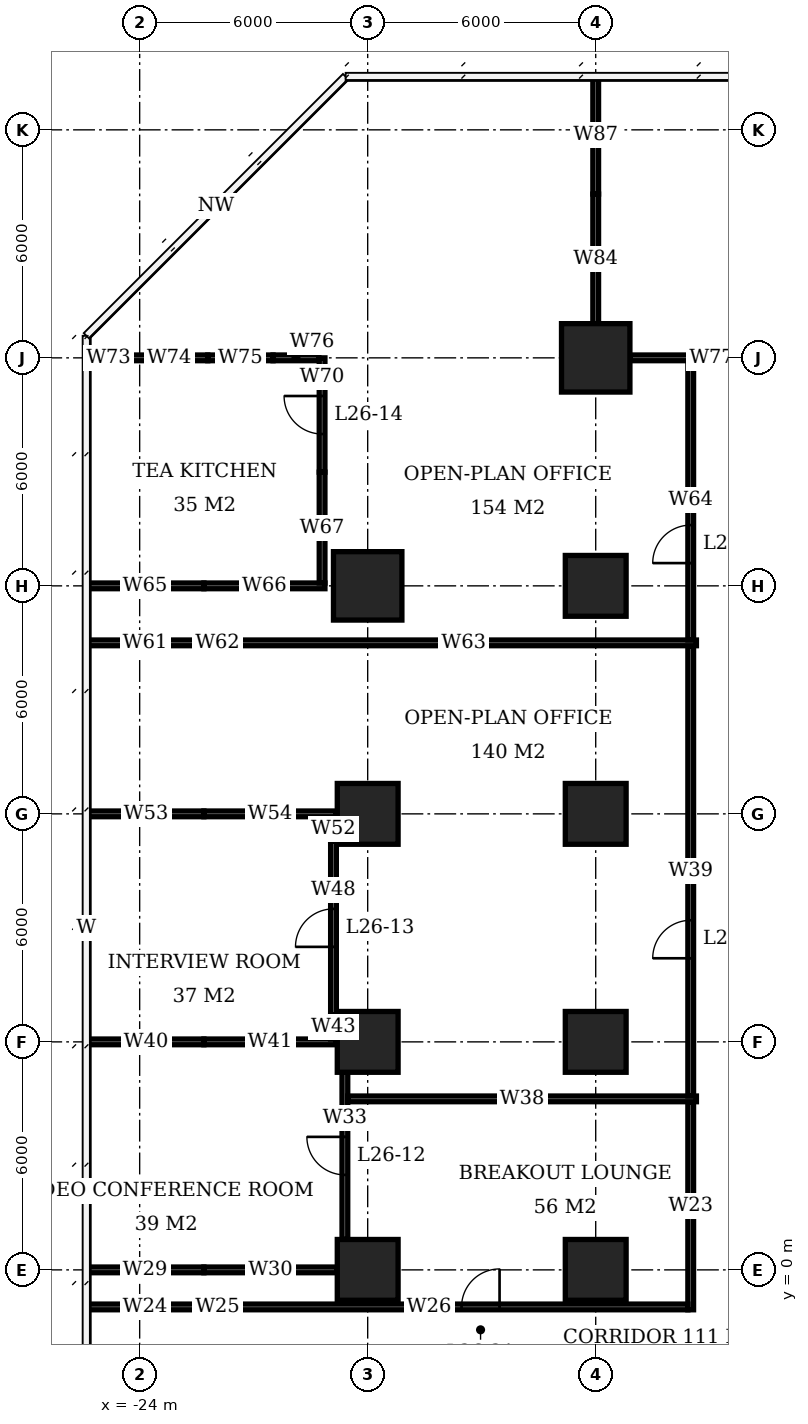
"""IFC4 building model, lengths in metres.
Left out: names, types, materials, properties, quantities, classifications, styles, units other than length and angle.
Written with IfcOpenShell. Run it as: python <this file> out.ifc"""

import sys

from ifc_helpers import new_model, si_unit, direction, frame, frame_2d, origin, origin_2d, place, context, subcontext, project, spatial, rectangle, extrude, element, fill, save


model = new_model("IFC4")
c1 = context("Model", 3, precision=1e-05, world=origin(), true_north=direction((0.0, 1.0)))
c2 = subcontext(c1, "Body", "Model", "MODEL_VIEW")
j1 = project(units=[si_unit("LENGTHUNIT", "METRE"), si_unit("PLANEANGLEUNIT", "RADIAN")], contexts=[c1])
p1 = place(None, origin())
s1 = spatial("IfcSite", under=j1, at=p1, CompositionType="ELEMENT")
p2 = place(p1, origin())
s2 = spatial("IfcBuilding", under=s1, at=p2, CompositionType="ELEMENT")
p3 = place(p2, frame((0.0, 0.0, 109.4)))
s3 = spatial("IfcBuildingStorey", under=s2, at=p3, CompositionType="ELEMENT", Elevation=109.4)
for number, where, z_axis, x_axis in (
    (1, (-18.0, 0.0, 0.0), (0.0, 0.0, 1.0), (1.0, 0.0, 0.0)),
    (2, (-18.0, 6.0, 0.0), (0.0, 0.0, 1.0), (1.0, 0.0, 0.0)),
    (3, (-18.0, 12.0, 0.0), (0.0, 0.0, 1.0), (1.0, 0.0, 0.0)),
):
    element("IfcColumn", number, at=place(p3, frame(where, z_axis=z_axis, x_axis=x_axis)), inside=s3, PredefinedType="COLUMN", context=c2, shape_type="SweptSolid", body=[
        extrude(rectangle(XDim=1.6, YDim=1.6, at=origin_2d()), origin(), (0.0, 0.0, 1.0), 3.9),
    ])
p4 = place(p3, frame((-18.0, 18.0, 0.0), z_axis=(0.0, 0.0, 1.0), x_axis=(1.0, 0.0, 0.0)))
e4 = element("IfcColumn", 4, at=p4, inside=s3, PredefinedType="COLUMN", context=c2, shape_type="SweptSolid", body=[
    extrude(rectangle(XDim=1.8, YDim=1.8, at=origin_2d()), origin(), (0.0, 0.0, 1.0), 3.9),
])
for number, where, z_axis, x_axis in (
    (5, (-12.0, 0.0, 0.0), (0.0, 0.0, 1.0), (1.0, 0.0, 0.0)),
    (6, (-12.0, 6.0, 0.0), (0.0, 0.0, 1.0), (1.0, 0.0, 0.0)),
    (7, (-12.0, 12.0, 0.0), (0.0, 0.0, 1.0), (1.0, 0.0, 0.0)),
    (8, (-12.0, 18.0, 0.0), (0.0, 0.0, 1.0), (1.0, 0.0, 0.0)),
):
    element("IfcColumn", number, at=place(p3, frame(where, z_axis=z_axis, x_axis=x_axis)), inside=s3, PredefinedType="COLUMN", context=c2, shape_type="SweptSolid", body=[
        extrude(rectangle(XDim=1.6, YDim=1.6, at=origin_2d()), origin(), (0.0, 0.0, 1.0), 3.9),
    ])
p5 = place(p3, frame((-12.0, 24.0, 0.0), z_axis=(0.0, 0.0, 1.0), x_axis=(1.0, 0.0, 0.0)))
e9 = element("IfcColumn", 9, at=p5, inside=s3, PredefinedType="COLUMN", context=c2, shape_type="SweptSolid", body=[
    extrude(rectangle(XDim=1.8, YDim=1.8, at=origin_2d()), origin(), (0.0, 0.0, 1.0), 3.9),
])
p6 = place(p3, frame((-25.4, 0.0, 0.0), z_axis=(0.0, 0.0, 1.0), x_axis=(1.0, 0.0, 0.0)))
e10 = element("IfcWall", 10, at=p6, inside=s3, PredefinedType="PARTITIONING", context=c2, shape_type="SweptSolid", body=[
    extrude(rectangle(XDim=3.09, YDim=0.15, at=frame_2d((1.545, 0.0))), origin(), (0.0, 0.0, 1.0), 3.65),
])
p7 = place(p3, frame((-22.31, 0.0, 0.0), z_axis=(0.0, 0.0, 1.0), x_axis=(1.0, 0.0, 0.0)))
e11 = element("IfcWall", 11, at=p7, inside=s3, PredefinedType="PARTITIONING", context=c2, shape_type="SweptSolid", body=[
    extrude(rectangle(XDim=3.51, YDim=0.15, at=frame_2d((1.755, 0.0))), origin(), (0.0, 0.0, 1.0), 2.65),
])
p8 = place(p3, frame((-25.35, 6.0, 0.0), z_axis=(0.0, 0.0, 1.0), x_axis=(1.0, 0.0, 0.0)))
e12 = element("IfcWall", 12, at=p8, inside=s3, PredefinedType="PARTITIONING", context=c2, shape_type="SweptSolid", body=[
    extrude(rectangle(XDim=3.04, YDim=0.15, at=frame_2d((1.52, 0.0))), origin(), (0.0, 0.0, 1.0), 3.65),
])
p9 = place(p3, frame((-22.31, 6.0, 0.0), z_axis=(0.0, 0.0, 1.0), x_axis=(1.0, 0.0, 0.0)))
e13 = element("IfcWall", 13, at=p9, inside=s3, PredefinedType="PARTITIONING", context=c2, shape_type="SweptSolid", body=[
    extrude(rectangle(XDim=3.485, YDim=0.15, at=frame_2d((1.743, 0.0))), origin(), (0.0, 0.0, 1.0), 2.65),
])
p10 = place(p3, frame((-25.35, 12.0, 0.0), z_axis=(0.0, 0.0, 1.0), x_axis=(1.0, 0.0, 0.0)))
e14 = element("IfcWall", 14, at=p10, inside=s3, PredefinedType="PARTITIONING", context=c2, shape_type="SweptSolid", body=[
    extrude(rectangle(XDim=3.04, YDim=0.15, at=frame_2d((1.52, 0.0))), origin(), (0.0, 0.0, 1.0), 3.65),
])
p11 = place(p3, frame((-22.31, 12.0, 0.0), z_axis=(0.0, 0.0, 1.0), x_axis=(1.0, 0.0, 0.0)))
e15 = element("IfcWall", 15, at=p11, inside=s3, PredefinedType="PARTITIONING", context=c2, shape_type="SweptSolid", body=[
    extrude(rectangle(XDim=3.485, YDim=0.15, at=frame_2d((1.743, 0.0))), origin(), (0.0, 0.0, 1.0), 2.65),
])
p12 = place(p3, frame((-25.4, 18.0, 0.0), z_axis=(0.0, 0.0, 1.0), x_axis=(1.0, 0.0, 0.0)))
e16 = element("IfcWall", 16, at=p12, inside=s3, PredefinedType="PARTITIONING", context=c2, shape_type="SweptSolid", body=[
    extrude(rectangle(XDim=3.09, YDim=0.15, at=frame_2d((1.545, 0.0))), origin(), (0.0, 0.0, 1.0), 3.65),
])
p13 = place(p3, frame((-22.31, 18.0, 0.0), z_axis=(0.0, 0.0, 1.0), x_axis=(1.0, 0.0, 0.0)))
e17 = element("IfcWall", 17, at=p13, inside=s3, PredefinedType="PARTITIONING", context=c2, shape_type="SweptSolid", body=[
    extrude(rectangle(XDim=3.185, YDim=0.15, at=frame_2d((1.593, 0.0))), origin(), (0.0, 0.0, 1.0), 2.65),
])
p14 = place(p3, frame((-25.4, 24.0, 0.0), z_axis=(0.0, 0.0, 1.0), x_axis=(1.0, 0.0, 0.0)))
e18 = element("IfcWall", 18, at=p14, inside=s3, PredefinedType="PARTITIONING", context=c2, shape_type="SweptSolid", body=[
    extrude(rectangle(XDim=1.163, YDim=0.15, at=frame_2d((0.582, 0.0))), origin(), (0.0, 0.0, 1.0), 3.65),
])
p15 = place(p3, frame((-24.237, 24.0, 0.0), z_axis=(0.0, 0.0, 1.0), x_axis=(1.0, 0.0, 0.0)))
e19 = element("IfcWall", 19, at=p15, inside=s3, PredefinedType="PARTITIONING", context=c2, shape_type="SweptSolid", body=[
    extrude(rectangle(XDim=2.029, YDim=0.15, at=frame_2d((1.015, 0.0))), origin(), (0.0, 0.0, 1.0), 2.65),
])
p16 = place(p3, frame((-22.208, 24.0, 0.0), z_axis=(0.0, 0.0, 1.0), x_axis=(1.0, 0.0, 0.0)))
e20 = element("IfcWall", 20, at=p16, inside=s3, PredefinedType="PARTITIONING", context=c2, shape_type="SweptSolid", body=[
    extrude(rectangle(XDim=1.718, YDim=0.15, at=frame_2d((0.859, 0.0))), origin(), (0.0, 0.0, 1.0), 3.65),
])
p17 = place(p3, frame((-20.49, 24.0, 0.0), z_axis=(0.0, 0.0, 1.0), x_axis=(1.0, 0.0, 0.0)))
e21 = element("IfcWall", 21, at=p17, inside=s3, PredefinedType="PARTITIONING", context=c2, shape_type="SweptSolid", body=[
    extrude(rectangle(XDim=1.205, YDim=0.15, at=frame_2d((0.603, 0.0))), origin(), (0.0, 0.0, 1.0), 2.65),
])
p18 = place(p3, frame((-11.1, 24.0, 0.0), z_axis=(0.0, 0.0, 1.0), x_axis=(1.0, 0.0, 0.0)))
e22 = element("IfcWall", 22, at=p18, inside=s3, PredefinedType="PARTITIONING", context=c2, shape_type="SweptSolid", body=[
    extrude(rectangle(XDim=4.3, YDim=0.15, at=frame_2d((2.15, 0.0))), origin(), (0.0, 0.0, 1.0), 3.65),
])
p19 = place(p3, frame((-19.2, 18.075, 0.0), z_axis=(0.0, 0.0, 1.0), x_axis=(0.0, 1.0, 0.0)))
e23 = element("IfcWall", 23, at=p19, inside=s3, PredefinedType="PARTITIONING", context=c2, shape_type="SweptSolid", body=[
    extrude(rectangle(XDim=2.917, YDim=0.15, at=frame_2d((1.458, 0.0))), origin(), (0.0, 0.0, 1.0), 2.65),
])
p20 = place(p3, frame((-19.2, 20.992, 0.0), z_axis=(0.0, 0.0, 1.0), x_axis=(0.0, 1.0, 0.0)))
e24 = element("IfcWall", 24, at=p20, inside=s3, PredefinedType="PARTITIONING", context=c2, shape_type="SweptSolid", body=[
    extrude(rectangle(XDim=3.008, YDim=0.15, at=frame_2d((1.504, 0.0))), origin(), (0.0, 0.0, 1.0), 3.65),
])
p21 = place(p20, frame((1.004, 0.0, 0.0)))
e25 = element("IfcOpeningElement", 25, at=p21, cuts=e24, PredefinedType="OPENING", context=c2, shape_type="SweptSolid", body=[
    extrude(rectangle(XDim=1.0, YDim=2.1, at=frame_2d((0.5, 1.05))), frame((0.0, 0.085, 0.0), z_axis=(0.0, -1.0, 0.0), x_axis=(1.0, 0.0, 0.0)), (0.0, 0.0, 1.0), 0.17),
])
p22 = place(p3, frame((-18.9, 6.075, 0.0), z_axis=(0.0, 0.0, 1.0), x_axis=(0.0, 1.0, 0.0)))
e26 = element("IfcWall", 26, at=p22, inside=s3, PredefinedType="PARTITIONING", context=c2, shape_type="SweptSolid", body=[
    extrude(rectangle(XDim=0.635, YDim=0.15, at=frame_2d((0.317, 0.0))), origin(), (0.0, 0.0, 1.0), 2.65),
])
p23 = place(p3, frame((-18.9, 6.71, 0.0), z_axis=(0.0, 0.0, 1.0), x_axis=(0.0, 1.0, 0.0)))
e27 = element("IfcWall", 27, at=p23, inside=s3, PredefinedType="PARTITIONING", context=c2, shape_type="SweptSolid", body=[
    extrude(rectangle(XDim=4.58, YDim=0.15, at=frame_2d((2.29, 0.0))), origin(), (0.0, 0.0, 1.0), 3.65),
])
p24 = place(p23, frame((1.79, 0.0, 0.0)))
e28 = element("IfcOpeningElement", 28, at=p24, cuts=e27, PredefinedType="OPENING", context=c2, shape_type="SweptSolid", body=[
    extrude(rectangle(XDim=1.0, YDim=2.1, at=frame_2d((0.5, 1.05))), frame((0.0, 0.085, 0.0), z_axis=(0.0, -1.0, 0.0), x_axis=(1.0, 0.0, 0.0)), (0.0, 0.0, 1.0), 0.17),
])
p25 = place(p3, frame((-18.9, 11.29, 0.0), z_axis=(0.0, 0.0, 1.0), x_axis=(0.0, 1.0, 0.0)))
e29 = element("IfcWall", 29, at=p25, inside=s3, PredefinedType="PARTITIONING", context=c2, shape_type="SweptSolid", body=[
    extrude(rectangle(XDim=0.635, YDim=0.15, at=frame_2d((0.317, 0.0))), origin(), (0.0, 0.0, 1.0), 2.65),
])
p26 = place(p3, frame((-18.6, 0.8, 0.0), z_axis=(0.0, 0.0, 1.0), x_axis=(0.0, 1.0, 0.0)))
e30 = element("IfcWall", 30, at=p26, inside=s3, PredefinedType="PARTITIONING", context=c2, shape_type="SweptSolid", body=[
    extrude(rectangle(XDim=4.4, YDim=0.15, at=frame_2d((2.2, 0.0))), origin(), (0.0, 0.0, 1.0), 3.65),
])
p27 = place(p26, frame((1.7, 0.0, 0.0)))
e31 = element("IfcOpeningElement", 31, at=p27, cuts=e30, PredefinedType="OPENING", context=c2, shape_type="SweptSolid", body=[
    extrude(rectangle(XDim=1.0, YDim=2.1, at=frame_2d((0.5, 1.05))), frame((0.0, 0.085, 0.0), z_axis=(0.0, -1.0, 0.0), x_axis=(1.0, 0.0, 0.0)), (0.0, 0.0, 1.0), 0.17),
])
p28 = place(p3, frame((-12.0, 24.9, 0.0), z_axis=(0.0, 0.0, 1.0), x_axis=(0.0, 1.0, 0.0)))
e32 = element("IfcWall", 32, at=p28, inside=s3, PredefinedType="PARTITIONING", context=c2, shape_type="SweptSolid", body=[
    extrude(rectangle(XDim=3.41, YDim=0.15, at=frame_2d((1.705, 0.0))), origin(), (0.0, 0.0, 1.0), 2.65),
])
for number, where, z_axis, x_axis in (
    (33, (-12.0, 28.31, 0.0), (0.0, 0.0, 1.0), (0.0, 1.0, 0.0)),
    (34, (-25.4, -0.975, 0.0), (0.0, 0.0, 1.0), (1.0, 0.0, 0.0)),
):
    element("IfcWall", number, at=place(p3, frame(where, z_axis=z_axis, x_axis=x_axis)), inside=s3, PredefinedType="PARTITIONING", context=c2, shape_type="SweptSolid", body=[
        extrude(rectangle(XDim=3.09, YDim=0.15, at=frame_2d((1.545, 0.0))), origin(), (0.0, 0.0, 1.0), 3.65),
    ])
p29 = place(p3, frame((-22.31, -0.975, 0.0), z_axis=(0.0, 0.0, 1.0), x_axis=(1.0, 0.0, 0.0)))
e35 = element("IfcWall", 35, at=p29, inside=s3, PredefinedType="PARTITIONING", context=c2, shape_type="SweptSolid", body=[
    extrude(rectangle(XDim=0.72, YDim=0.15, at=frame_2d((0.36, 0.0))), origin(), (0.0, 0.0, 1.0), 2.65),
])
p30 = place(p3, frame((-21.59, -0.975, 0.0), z_axis=(0.0, 0.0, 1.0), x_axis=(1.0, 0.0, 0.0)))
e36 = element("IfcWall", 36, at=p30, inside=s3, PredefinedType="PARTITIONING", context=c2, shape_type="SweptSolid", body=[
    extrude(rectangle(XDim=12.015, YDim=0.15, at=frame_2d((6.008, 0.0))), origin(), (0.0, 0.0, 1.0), 3.65),
])
p31 = place(p30, frame((6.06, 0.0, 0.0)))
e37 = element("IfcOpeningElement", 37, at=p31, cuts=e36, PredefinedType="OPENING", context=c2, shape_type="SweptSolid", body=[
    extrude(rectangle(XDim=1.0, YDim=2.1, at=frame_2d((0.5, 1.05))), frame((0.0, 0.085, 0.0), z_axis=(0.0, -1.0, 0.0), x_axis=(1.0, 0.0, 0.0)), (0.0, 0.0, 1.0), 0.17),
])
p32 = place(p3, frame((-25.4, 16.5, 0.0), z_axis=(0.0, 0.0, 1.0), x_axis=(1.0, 0.0, 0.0)))
e38 = element("IfcWall", 38, at=p32, inside=s3, PredefinedType="PARTITIONING", context=c2, shape_type="SweptSolid", body=[
    extrude(rectangle(XDim=3.09, YDim=0.15, at=frame_2d((1.545, 0.0))), origin(), (0.0, 0.0, 1.0), 3.65),
])
p33 = place(p3, frame((-22.31, 16.5, 0.0), z_axis=(0.0, 0.0, 1.0), x_axis=(1.0, 0.0, 0.0)))
e39 = element("IfcWall", 39, at=p33, inside=s3, PredefinedType="PARTITIONING", context=c2, shape_type="SweptSolid", body=[
    extrude(rectangle(XDim=0.72, YDim=0.15, at=frame_2d((0.36, 0.0))), origin(), (0.0, 0.0, 1.0), 2.65),
])
p34 = place(p3, frame((-21.59, 16.5, 0.0), z_axis=(0.0, 0.0, 1.0), x_axis=(1.0, 0.0, 0.0)))
e40 = element("IfcWall", 40, at=p34, inside=s3, PredefinedType="PARTITIONING", context=c2, shape_type="SweptSolid", body=[
    extrude(rectangle(XDim=12.24, YDim=0.15, at=frame_2d((6.12, 0.0))), origin(), (0.0, 0.0, 1.0), 3.65),
])
p35 = place(p3, frame((-18.525, 4.5, 0.0), z_axis=(0.0, 0.0, 1.0), x_axis=(1.0, 0.0, 0.0)))
e41 = element("IfcWall", 41, at=p35, inside=s3, PredefinedType="PARTITIONING", context=c2, shape_type="SweptSolid", body=[
    extrude(rectangle(XDim=9.175, YDim=0.15, at=frame_2d((4.587, 0.0))), origin(), (0.0, 0.0, 1.0), 3.65),
])
p36 = place(p3, frame((-9.5, -1.05, 0.0), z_axis=(0.0, 0.0, 1.0), x_axis=(0.0, 1.0, 0.0)))
e42 = element("IfcWall", 42, at=p36, inside=s3, PredefinedType="PARTITIONING", context=c2, shape_type="SweptSolid", body=[
    extrude(rectangle(XDim=5.475, YDim=0.15, at=frame_2d((2.738, 0.0))), origin(), (0.0, 0.0, 1.0), 3.65),
])
p37 = place(p3, frame((-9.5, 4.575, 0.0), z_axis=(0.0, 0.0, 1.0), x_axis=(0.0, 1.0, 0.0)))
e43 = element("IfcWall", 43, at=p37, inside=s3, PredefinedType="PARTITIONING", context=c2, shape_type="SweptSolid", body=[
    extrude(rectangle(XDim=11.85, YDim=0.15, at=frame_2d((5.925, 0.0))), origin(), (0.0, 0.0, 1.0), 3.65),
])
p38 = place(p37, frame((3.625, 0.0, 0.0)))
e44 = element("IfcOpeningElement", 44, at=p38, cuts=e43, PredefinedType="OPENING", context=c2, shape_type="SweptSolid", body=[
    extrude(rectangle(XDim=1.0, YDim=2.1, at=frame_2d((0.5, 1.05))), frame((0.0, 0.085, 0.0), z_axis=(0.0, -1.0, 0.0), x_axis=(1.0, 0.0, 0.0)), (0.0, 0.0, 1.0), 0.17),
])
p39 = place(p3, frame((-9.5, 16.575, 0.0), z_axis=(0.0, 0.0, 1.0), x_axis=(0.0, 1.0, 0.0)))
e45 = element("IfcWall", 45, at=p39, inside=s3, PredefinedType="PARTITIONING", context=c2, shape_type="SweptSolid", body=[
    extrude(rectangle(XDim=7.35, YDim=0.15, at=frame_2d((3.675, 0.0))), origin(), (0.0, 0.0, 1.0), 3.65),
])
p40 = place(p39, frame((2.024, 0.0, 0.0)))
e46 = element("IfcOpeningElement", 46, at=p40, cuts=e45, PredefinedType="OPENING", context=c2, shape_type="SweptSolid", body=[
    extrude(rectangle(XDim=1.0, YDim=2.1, at=frame_2d((0.5, 1.05))), frame((0.0, 0.085, 0.0), z_axis=(0.0, -1.0, 0.0), x_axis=(1.0, 0.0, 0.0)), (0.0, 0.0, 1.0), 0.17),
])
p41 = place(p27, origin())
e47 = element("IfcDoor", 47, at=p41, inside=s3, OperationType="SINGLE_SWING_RIGHT", PredefinedType="DOOR", context=c2, shape_type="SweptSolid", body=[
    extrude(rectangle(XDim=1.0, YDim=2.1, at=frame_2d((0.5, 1.05))), frame((0.0, 0.025, 0.0), z_axis=(0.0, -1.0, 0.0), x_axis=(1.0, 0.0, 0.0)), (0.0, 0.0, 1.0), 0.05),
])
fill(e31, e47)
p42 = place(p24, origin())
e48 = element("IfcDoor", 48, at=p42, inside=s3, OperationType="SINGLE_SWING_LEFT", PredefinedType="DOOR", context=c2, shape_type="SweptSolid", body=[
    extrude(rectangle(XDim=1.0, YDim=2.1, at=frame_2d((0.5, 1.05))), frame((0.0, 0.025, 0.0), z_axis=(0.0, -1.0, 0.0), x_axis=(1.0, 0.0, 0.0)), (0.0, 0.0, 1.0), 0.05),
])
fill(e28, e48)
p43 = place(p21, origin())
e49 = element("IfcDoor", 49, at=p43, inside=s3, OperationType="SINGLE_SWING_RIGHT", PredefinedType="DOOR", context=c2, shape_type="SweptSolid", body=[
    extrude(rectangle(XDim=1.0, YDim=2.1, at=frame_2d((0.5, 1.05))), frame((0.0, 0.025, 0.0), z_axis=(0.0, -1.0, 0.0), x_axis=(1.0, 0.0, 0.0)), (0.0, 0.0, 1.0), 0.05),
])
fill(e25, e49)
p44 = place(p31, origin())
e50 = element("IfcDoor", 50, at=p44, inside=s3, OperationType="SINGLE_SWING_RIGHT", PredefinedType="DOOR", context=c2, shape_type="SweptSolid", body=[
    extrude(rectangle(XDim=1.0, YDim=2.1, at=frame_2d((0.5, 1.05))), frame((0.0, 0.025, 0.0), z_axis=(0.0, -1.0, 0.0), x_axis=(1.0, 0.0, 0.0)), (0.0, 0.0, 1.0), 0.05),
])
fill(e37, e50)
p45 = place(p38, origin())
e51 = element("IfcDoor", 51, at=p45, inside=s3, OperationType="SINGLE_SWING_LEFT", PredefinedType="DOOR", context=c2, shape_type="SweptSolid", body=[
    extrude(rectangle(XDim=1.0, YDim=2.1, at=frame_2d((0.5, 1.05))), frame((0.0, 0.025, 0.0), z_axis=(0.0, -1.0, 0.0), x_axis=(1.0, 0.0, 0.0)), (0.0, 0.0, 1.0), 0.05),
])
fill(e44, e51)
p46 = place(p40, origin())
e52 = element("IfcDoor", 52, at=p46, inside=s3, OperationType="SINGLE_SWING_LEFT", PredefinedType="DOOR", context=c2, shape_type="SweptSolid", body=[
    extrude(rectangle(XDim=1.0, YDim=2.1, at=frame_2d((0.5, 1.05))), frame((0.0, 0.025, 0.0), z_axis=(0.0, -1.0, 0.0), x_axis=(1.0, 0.0, 0.0)), (0.0, 0.0, 1.0), 0.05),
])
fill(e46, e52)
save(model, sys.argv[1])
